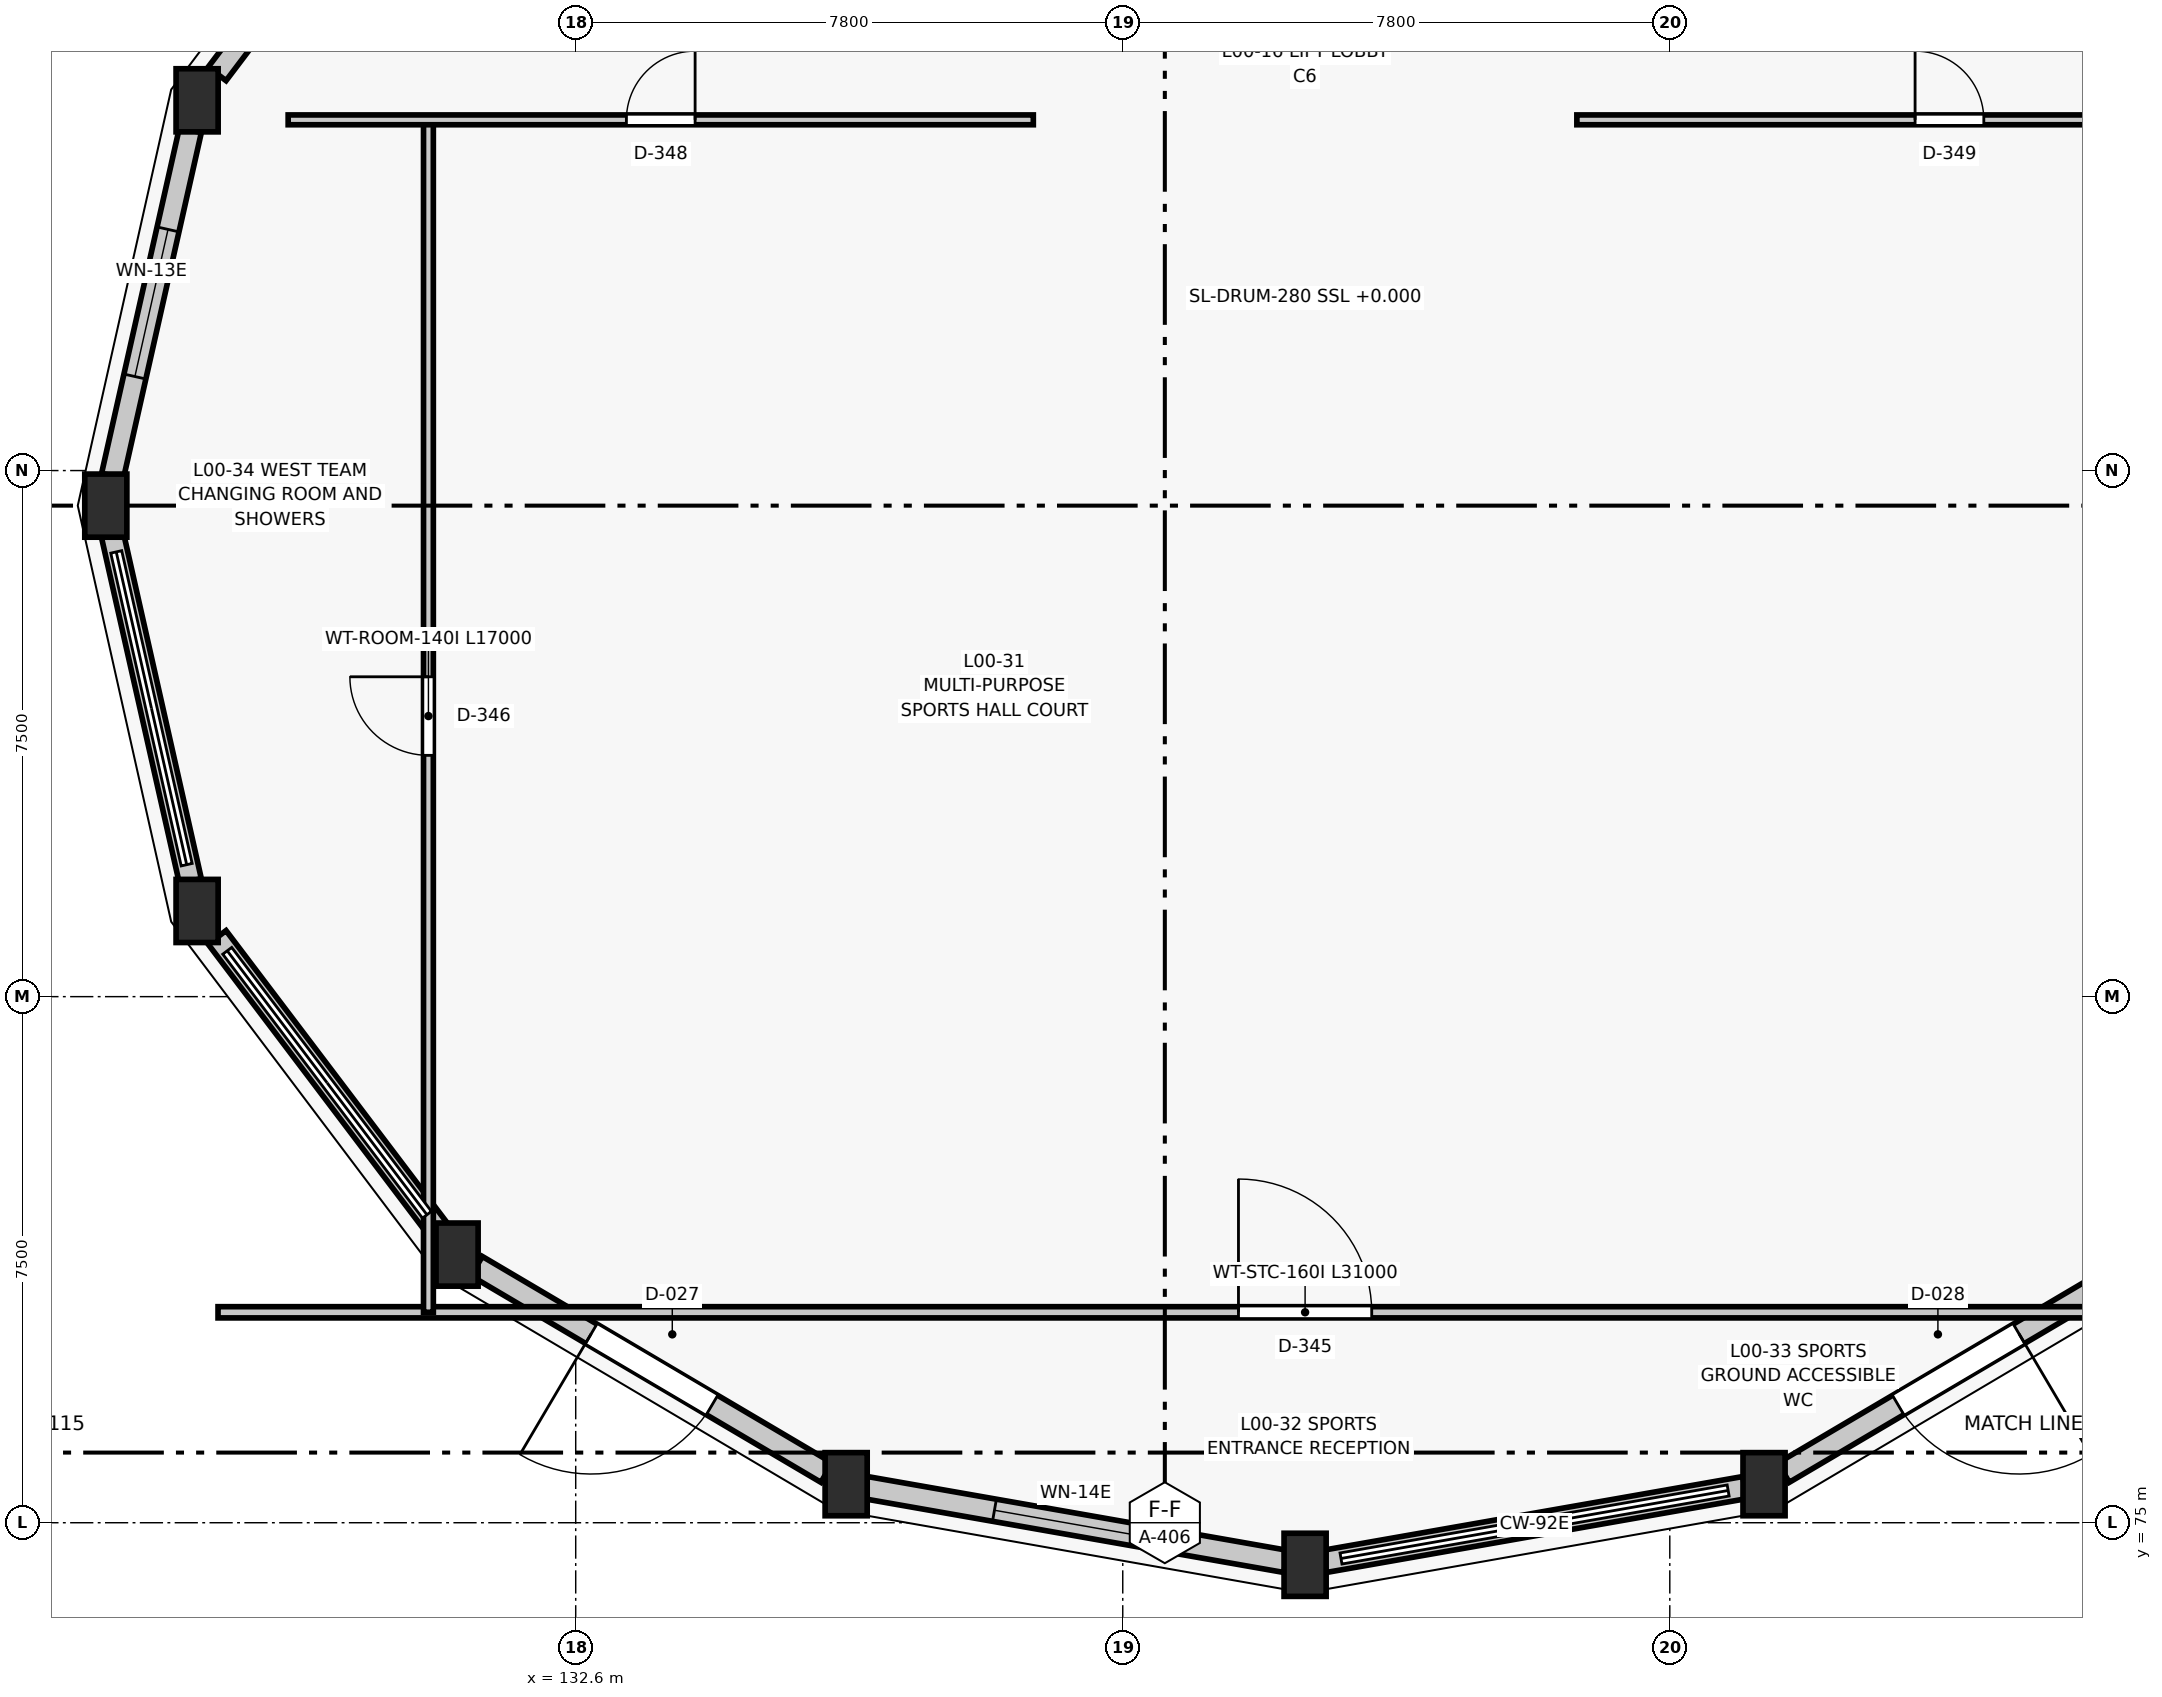
"""IFC4 building model, lengths in metres.
Left out: names, types, materials, properties, quantities, classifications, styles, units other than length and angle.
Written with IfcOpenShell. Run it as: python <this file> out.ifc"""

import sys

from ifc_helpers import new_model, si_unit, direction, frame, frame_2d, origin, origin_2d, place, context, subcontext, project, spatial, rectangle, extrude, element, fill, save


model = new_model("IFC4")
c1 = context("Model", 3, precision=1e-05, world=origin(), true_north=direction((0.0, 1.0)))
c2 = subcontext(c1, "Body", "Model", "MODEL_VIEW")
j1 = project(units=[si_unit("LENGTHUNIT", "METRE"), si_unit("PLANEANGLEUNIT", "RADIAN")], contexts=[c1])
p1 = place(None, origin())
s1 = spatial("IfcSite", under=j1, at=p1, CompositionType="ELEMENT")
p2 = place(p1, origin())
s2 = spatial("IfcBuilding", under=s1, at=p2, CompositionType="ELEMENT")
p3 = place(p2, origin())
s3 = spatial("IfcBuildingStorey", under=s2, at=p3, CompositionType="ELEMENT", Elevation=0.0)
for number, where, z_axis, x_axis in (
    (1, (127.202, 95.279, 0.0), (0.0, 0.0, 1.0), (1.0, 0.0, 0.0)),
    (2, (125.9, 89.5, 0.0), (0.0, 0.0, 1.0), (1.0, 0.0, 0.0)),
    (3, (127.202, 83.721, 0.0), (0.0, 0.0, 1.0), (1.0, 0.0, 0.0)),
    (4, (130.908, 78.823, 0.0), (0.0, 0.0, 1.0), (1.0, 0.0, 0.0)),
    (5, (136.456, 75.549, 0.0), (0.0, 0.0, 1.0), (1.0, 0.0, 0.0)),
    (6, (143.0, 74.4, 0.0), (0.0, 0.0, 1.0), (1.0, 0.0, 0.0)),
    (7, (149.544, 75.549, 0.0), (0.0, 0.0, 1.0), (1.0, 0.0, 0.0)),
):
    element("IfcColumn", number, at=place(p3, frame(where, z_axis=z_axis, x_axis=x_axis)), inside=s3, PredefinedType="COLUMN", context=c2, shape_type="SweptSolid", body=[
        extrude(rectangle(XDim=0.6, YDim=0.9, at=origin_2d()), origin(), (0.0, 0.0, 1.0), 4.5),
    ])
p4 = place(p3, frame((127.487, 95.655, 0.0), z_axis=(0.0, 0.0, 1.0), x_axis=(0.603398282319, 0.797439974477, 0.0)))
e8 = element("IfcWall", 8, at=p4, inside=s3, PredefinedType="STANDARD", context=c2, shape_type="SweptSolid", body=[
    extrude(rectangle(XDim=5.199, YDim=0.32, at=frame_2d((2.599, 0.0))), origin(), (0.0, 0.0, 1.0), 3.445),
])
p5 = place(p4, frame((1.599, 0.0, 0.0)))
e9 = element("IfcOpeningElement", 9, at=p5, cuts=e8, PredefinedType="OPENING", context=c2, shape_type="SweptSolid", body=[
    extrude(rectangle(XDim=2.0, YDim=2.3, at=frame_2d((1.0, 1.15))), frame((0.0, 0.17, 0.0), z_axis=(0.0, -1.0, 0.0), x_axis=(1.0, 0.0, 0.0)), (0.0, 0.0, 1.0), 0.34),
])
p6 = place(p3, frame((125.996, 89.926, 0.0), z_axis=(0.0, 0.0, 1.0), x_axis=(0.219744533343, 0.97555745093, 0.0)))
e10 = element("IfcWall", 10, at=p6, inside=s3, PredefinedType="STANDARD", context=c2, shape_type="SweptSolid", body=[
    extrude(rectangle(XDim=5.051, YDim=0.32, at=frame_2d((2.525, 0.0))), origin(), (0.0, 0.0, 1.0), 3.445),
])
p7 = place(p6, frame((1.45, 0.0, 0.9)))
e11 = element("IfcOpeningElement", 11, at=p7, cuts=e10, PredefinedType="OPENING", context=c2, shape_type="SweptSolid", body=[
    extrude(rectangle(XDim=2.15, YDim=1.55, at=frame_2d((1.075, 0.775))), frame((0.0, 0.17, 0.0), z_axis=(0.0, -1.0, 0.0), x_axis=(1.0, 0.0, 0.0)), (0.0, 0.0, 1.0), 0.34),
])
p8 = place(p3, frame((127.106, 84.147, 0.0), z_axis=(0.0, 0.0, 1.0), x_axis=(-0.219744533343, 0.97555745093, 0.0)))
e12 = element("IfcWall", 12, at=p8, inside=s3, PredefinedType="STANDARD", context=c2, shape_type="SweptSolid", body=[
    extrude(rectangle(XDim=5.051, YDim=0.32, at=frame_2d((2.525, 0.0))), origin(), (0.0, 0.0, 1.0), 0.85),
])
p9 = place(p3, frame((130.624, 79.199, 0.0), z_axis=(0.0, 0.0, 1.0), x_axis=(-0.603398282319, 0.797439974477, 0.0)))
e13 = element("IfcWall", 13, at=p9, inside=s3, PredefinedType="STANDARD", context=c2, shape_type="SweptSolid", body=[
    extrude(rectangle(XDim=5.199, YDim=0.32, at=frame_2d((2.599, 0.0))), origin(), (0.0, 0.0, 1.0), 0.85),
])
p10 = place(p3, frame((136.177, 75.714, 0.0), z_axis=(0.0, 0.0, 1.0), x_axis=(-0.861235880181, 0.508205429614, 0.0)))
e14 = element("IfcWall", 14, at=p10, inside=s3, PredefinedType="STANDARD", context=c2, shape_type="SweptSolid", body=[
    extrude(rectangle(XDim=5.794, YDim=0.32, at=frame_2d((2.897, 0.0))), origin(), (0.0, 0.0, 1.0), 3.445),
])
p11 = place(p10, frame((1.897, 0.0, 0.0)))
e15 = element("IfcOpeningElement", 15, at=p11, cuts=e14, PredefinedType="OPENING", context=c2, shape_type="SweptSolid", body=[
    extrude(rectangle(XDim=2.0, YDim=2.3, at=frame_2d((1.0, 1.15))), frame((0.0, 0.17, 0.0), z_axis=(0.0, -1.0, 0.0), x_axis=(1.0, 0.0, 0.0)), (0.0, 0.0, 1.0), 0.34),
])
p12 = place(p3, frame((142.725, 74.448, 0.0), z_axis=(0.0, 0.0, 1.0), x_axis=(-0.984927418504, 0.172968148166, 0.0)))
e16 = element("IfcWall", 16, at=p12, inside=s3, PredefinedType="STANDARD", context=c2, shape_type="SweptSolid", body=[
    extrude(rectangle(XDim=6.085, YDim=0.32, at=frame_2d((3.042, 0.0))), origin(), (0.0, 0.0, 1.0), 3.445),
])
p13 = place(p12, frame((1.867, 0.0, 0.9)))
e17 = element("IfcOpeningElement", 17, at=p13, cuts=e16, PredefinedType="OPENING", context=c2, shape_type="SweptSolid", body=[
    extrude(rectangle(XDim=2.35, YDim=1.55, at=frame_2d((1.175, 0.775))), frame((0.0, 0.17, 0.0), z_axis=(0.0, -1.0, 0.0), x_axis=(1.0, 0.0, 0.0)), (0.0, 0.0, 1.0), 0.34),
])
p14 = place(p3, frame((149.269, 75.501, 0.0), z_axis=(0.0, 0.0, 1.0), x_axis=(-0.984927418504, -0.172968148166, 0.0)))
e18 = element("IfcWall", 18, at=p14, inside=s3, PredefinedType="STANDARD", context=c2, shape_type="SweptSolid", body=[
    extrude(rectangle(XDim=6.085, YDim=0.32, at=frame_2d((3.042, 0.0))), origin(), (0.0, 0.0, 1.0), 0.85),
])
p15 = place(p3, frame((154.813, 78.658, 0.0), z_axis=(0.0, 0.0, 1.0), x_axis=(-0.861235880181, -0.508205429614, 0.0)))
e19 = element("IfcWall", 19, at=p15, inside=s3, PredefinedType="STANDARD", context=c2, shape_type="SweptSolid", body=[
    extrude(rectangle(XDim=5.794, YDim=0.32, at=frame_2d((2.897, 0.0))), origin(), (0.0, 0.0, 1.0), 3.445),
])
p16 = place(p15, frame((1.897, 0.0, 0.0)))
e20 = element("IfcOpeningElement", 20, at=p16, cuts=e19, PredefinedType="OPENING", context=c2, shape_type="SweptSolid", body=[
    extrude(rectangle(XDim=2.0, YDim=2.3, at=frame_2d((1.0, 1.15))), frame((0.0, 0.17, 0.0), z_axis=(0.0, -1.0, 0.0), x_axis=(1.0, 0.0, 0.0)), (0.0, 0.0, 1.0), 0.34),
])
p17 = place(p3, frame((127.5, 78.0, 0.0), z_axis=(0.0, 0.0, 1.0), x_axis=(1.0, 0.0, 0.0)))
e21 = element("IfcWall", 21, at=p17, inside=s3, PredefinedType="PARTITIONING", context=c2, shape_type="SweptSolid", body=[
    extrude(rectangle(XDim=31.0, YDim=0.16, at=frame_2d((15.5, 0.0))), origin(), (0.0, 0.0, 1.0), 4.255),
])
p18 = place(p17, frame((14.55, 0.0, 0.0)))
e22 = element("IfcOpeningElement", 22, at=p18, cuts=e21, PredefinedType="OPENING", context=c2, shape_type="SweptSolid", body=[
    extrude(rectangle(XDim=1.9, YDim=2.25, at=frame_2d((0.95, 1.125))), frame((0.0, 0.09, 0.0), z_axis=(0.0, -1.0, 0.0), x_axis=(1.0, 0.0, 0.0)), (0.0, 0.0, 1.0), 0.18),
])
p19 = place(p3, frame((130.5, 78.0, 0.0), z_axis=(0.0, 0.0, 1.0), x_axis=(0.0, 1.0, 0.0)))
e23 = element("IfcWall", 23, at=p19, inside=s3, PredefinedType="PARTITIONING", context=c2, shape_type="SweptSolid", body=[
    extrude(rectangle(XDim=17.0, YDim=0.14, at=frame_2d((8.5, 0.0))), origin(), (0.0, 0.0, 1.0), 4.255),
])
p20 = place(p19, frame((7.94, 0.0, 0.0)))
e24 = element("IfcOpeningElement", 24, at=p20, cuts=e23, PredefinedType="OPENING", context=c2, shape_type="SweptSolid", body=[
    extrude(rectangle(XDim=1.12, YDim=2.1, at=frame_2d((0.56, 1.05))), frame((0.0, 0.08, 0.0), z_axis=(0.0, -1.0, 0.0), x_axis=(1.0, 0.0, 0.0)), (0.0, 0.0, 1.0), 0.16),
])
p21 = place(p3, frame((128.5, 95.0, 0.0), z_axis=(0.0, 0.0, 1.0), x_axis=(1.0, 0.0, 0.0)))
e25 = element("IfcWall", 25, at=p21, inside=s3, PredefinedType="PARTITIONING", context=c2, shape_type="SweptSolid", body=[
    extrude(rectangle(XDim=10.625, YDim=0.14, at=frame_2d((5.312, 0.0))), origin(), (0.0, 0.0, 1.0), 4.255),
])
p22 = place(p21, frame((4.823, 0.0, 0.0)))
e26 = element("IfcOpeningElement", 26, at=p22, cuts=e25, PredefinedType="OPENING", context=c2, shape_type="SweptSolid", body=[
    extrude(rectangle(XDim=0.98, YDim=2.1, at=frame_2d((0.49, 1.05))), frame((0.0, 0.08, 0.0), z_axis=(0.0, -1.0, 0.0), x_axis=(1.0, 0.0, 0.0)), (0.0, 0.0, 1.0), 0.16),
])
p23 = place(p3, frame((146.875, 95.0, 0.0), z_axis=(0.0, 0.0, 1.0), x_axis=(1.0, 0.0, 0.0)))
e27 = element("IfcWall", 27, at=p23, inside=s3, PredefinedType="PARTITIONING", context=c2, shape_type="SweptSolid", body=[
    extrude(rectangle(XDim=10.625, YDim=0.14, at=frame_2d((5.312, 0.0))), origin(), (0.0, 0.0, 1.0), 4.255),
])
p24 = place(p23, frame((4.823, 0.0, 0.0)))
e28 = element("IfcOpeningElement", 28, at=p24, cuts=e27, PredefinedType="OPENING", context=c2, shape_type="SweptSolid", body=[
    extrude(rectangle(XDim=0.98, YDim=2.1, at=frame_2d((0.49, 1.05))), frame((0.0, 0.08, 0.0), z_axis=(0.0, -1.0, 0.0), x_axis=(1.0, 0.0, 0.0)), (0.0, 0.0, 1.0), 0.16),
])
p25 = place(p7, origin())
e29 = element("IfcWindow", 29, at=p25, inside=s3, PartitioningType="SINGLE_PANEL", PredefinedType="WINDOW", context=c2, shape_type="SweptSolid", body=[
    extrude(rectangle(XDim=2.15, YDim=1.55, at=frame_2d((1.075, 0.775))), frame((0.0, 0.03, 0.0), z_axis=(0.0, -1.0, 0.0), x_axis=(1.0, 0.0, 0.0)), (0.0, 0.0, 1.0), 0.06),
])
fill(e11, e29)
p26 = place(p11, origin())
e30 = element("IfcDoor", 30, at=p26, inside=s3, OperationType="SINGLE_SWING_RIGHT", PredefinedType="DOOR", context=c2, shape_type="SweptSolid", body=[
    extrude(rectangle(XDim=2.0, YDim=2.3, at=frame_2d((1.0, 1.15))), frame((0.0, 0.025, 0.0), z_axis=(0.0, -1.0, 0.0), x_axis=(1.0, 0.0, 0.0)), (0.0, 0.0, 1.0), 0.05),
])
fill(e15, e30)
p27 = place(p13, origin())
e31 = element("IfcWindow", 31, at=p27, inside=s3, PartitioningType="SINGLE_PANEL", PredefinedType="WINDOW", context=c2, shape_type="SweptSolid", body=[
    extrude(rectangle(XDim=2.35, YDim=1.55, at=frame_2d((1.175, 0.775))), frame((0.0, 0.03, 0.0), z_axis=(0.0, -1.0, 0.0), x_axis=(1.0, 0.0, 0.0)), (0.0, 0.0, 1.0), 0.06),
])
fill(e17, e31)
p28 = place(p16, origin())
e32 = element("IfcDoor", 32, at=p28, inside=s3, OperationType="SINGLE_SWING_LEFT", PredefinedType="DOOR", context=c2, shape_type="SweptSolid", body=[
    extrude(rectangle(XDim=2.0, YDim=2.3, at=frame_2d((1.0, 1.15))), frame((0.0, 0.025, 0.0), z_axis=(0.0, -1.0, 0.0), x_axis=(1.0, 0.0, 0.0)), (0.0, 0.0, 1.0), 0.05),
])
fill(e20, e32)
p29 = place(p18, origin())
e33 = element("IfcDoor", 33, at=p29, inside=s3, OperationType="SINGLE_SWING_LEFT", PredefinedType="DOOR", context=c2, shape_type="SweptSolid", body=[
    extrude(rectangle(XDim=1.9, YDim=2.25, at=frame_2d((0.95, 1.125))), frame((0.0, 0.025, 0.0), z_axis=(0.0, -1.0, 0.0), x_axis=(1.0, 0.0, 0.0)), (0.0, 0.0, 1.0), 0.05),
])
fill(e22, e33)
p30 = place(p20, origin())
e34 = element("IfcDoor", 34, at=p30, inside=s3, OperationType="SINGLE_SWING_RIGHT", PredefinedType="DOOR", context=c2, shape_type="SweptSolid", body=[
    extrude(rectangle(XDim=1.12, YDim=2.1, at=frame_2d((0.56, 1.05))), frame((0.0, 0.025, 0.0), z_axis=(0.0, -1.0, 0.0), x_axis=(1.0, 0.0, 0.0)), (0.0, 0.0, 1.0), 0.05),
])
fill(e24, e34)
p31 = place(p22, origin())
e35 = element("IfcDoor", 35, at=p31, inside=s3, OperationType="SINGLE_SWING_RIGHT", PredefinedType="DOOR", context=c2, shape_type="SweptSolid", body=[
    extrude(rectangle(XDim=0.98, YDim=2.1, at=frame_2d((0.49, 1.05))), frame((0.0, 0.025, 0.0), z_axis=(0.0, -1.0, 0.0), x_axis=(1.0, 0.0, 0.0)), (0.0, 0.0, 1.0), 0.05),
])
fill(e26, e35)
p32 = place(p24, origin())
e36 = element("IfcDoor", 36, at=p32, inside=s3, OperationType="SINGLE_SWING_LEFT", PredefinedType="DOOR", context=c2, shape_type="SweptSolid", body=[
    extrude(rectangle(XDim=0.98, YDim=2.1, at=frame_2d((0.49, 1.05))), frame((0.0, 0.025, 0.0), z_axis=(0.0, -1.0, 0.0), x_axis=(1.0, 0.0, 0.0)), (0.0, 0.0, 1.0), 0.05),
])
fill(e28, e36)
save(model, sys.argv[1])
